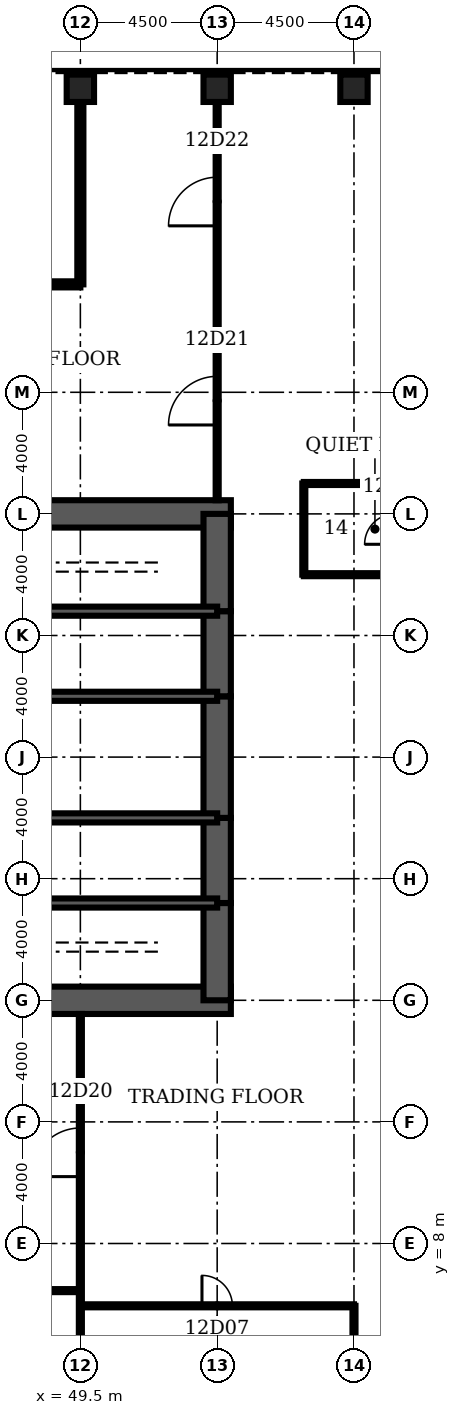
"""IFC4 building model, lengths in metres.
Left out: names, types, materials, properties, quantities, classifications, styles, units other than length and angle.
Written with IfcOpenShell. Run it as: python <this file> out.ifc"""

import sys

from ifc_helpers import new_model, si_unit, direction, frame, frame_2d, origin, origin_2d, place, context, subcontext, project, spatial, rectangle, hollow_rectangle, extrude, element, fill, save


model = new_model("IFC4")
c1 = context("Model", 3, precision=1e-05, world=origin(), true_north=direction((0.0, 1.0)))
c2 = subcontext(c1, "Body", "Model", "MODEL_VIEW")
j1 = project(units=[si_unit("LENGTHUNIT", "METRE"), si_unit("PLANEANGLEUNIT", "RADIAN")], contexts=[c1])
p1 = place(None, origin())
s1 = spatial("IfcSite", under=j1, at=p1, CompositionType="ELEMENT")
p2 = place(p1, origin())
s2 = spatial("IfcBuilding", under=s1, at=p2, CompositionType="ELEMENT")
p3 = place(p2, frame((0.0, 0.0, 59.0)))
s3 = spatial("IfcBuildingStorey", under=s2, at=p3, CompositionType="ELEMENT", Elevation=59.0)
for number, where, z_axis, x_axis in (
    (1, (58.5, 46.0, 0.0), (0.0, 0.0, 1.0), (0.0, 1.0, 0.0)),
    (2, (54.0, 46.0, 0.0), (0.0, 0.0, 1.0), (0.0, 1.0, 0.0)),
    (3, (49.5, 46.0, 0.0), (0.0, 0.0, 1.0), (0.0, 1.0, 0.0)),
):
    element("IfcColumn", number, at=place(p3, frame(where, z_axis=z_axis, x_axis=x_axis)), inside=s3, PredefinedType="COLUMN", context=c2, shape_type="SweptSolid", body=[
        extrude(hollow_rectangle(XDim=0.9, YDim=0.9, WallThickness=0.12, at=origin_2d()), origin(), (0.0, 0.0, 1.0), 4.5),
    ])
for number, where, z_axis, x_axis in (
    (4, (45.0, 16.0, 0.0), (0.0, 0.0, 1.0), (1.0, 0.0, 0.0)),
    (5, (54.45, 32.0, 0.0), (0.0, 0.0, 1.0), (-1.0, 0.0, 0.0)),
):
    element("IfcWall", number, at=place(p3, frame(where, z_axis=z_axis, x_axis=x_axis)), inside=s3, PredefinedType="SHEAR", context=c2, shape_type="SweptSolid", body=[
        extrude(rectangle(XDim=9.45, YDim=0.9, at=frame_2d((4.725, 0.0))), origin(), (0.0, 0.0, 1.0), 4.5),
    ])
p4 = place(p3, frame((54.0, 16.0, 0.0), z_axis=(0.0, 0.0, 1.0), x_axis=(0.0, 1.0, 0.0)))
e6 = element("IfcWall", 6, at=p4, inside=s3, PredefinedType="SHEAR", context=c2, shape_type="SweptSolid", body=[
    extrude(rectangle(XDim=3.2, YDim=0.9, at=frame_2d((1.6, 0.0))), origin(), (0.0, 0.0, 1.0), 4.5),
])
p5 = place(p3, frame((54.0, 19.2, 0.0), z_axis=(0.0, 0.0, 1.0), x_axis=(0.0, 1.0, 0.0)))
e7 = element("IfcWall", 7, at=p5, inside=s3, PredefinedType="SHEAR", context=c2, shape_type="SweptSolid", body=[
    extrude(rectangle(XDim=2.8, YDim=0.9, at=frame_2d((1.4, 0.0))), origin(), (0.0, 0.0, 1.0), 4.5),
])
p6 = place(p5, frame((0.4, 0.0, 0.0)))
e8 = element("IfcOpeningElement", 8, at=p6, cuts=e7, PredefinedType="OPENING", context=c2, shape_type="SweptSolid", body=[
    extrude(rectangle(XDim=1.8, YDim=2.1, at=frame_2d((0.9, 1.05))), frame((0.0, 0.46, 0.0), z_axis=(0.0, -1.0, 0.0), x_axis=(1.0, 0.0, 0.0)), (0.0, 0.0, 1.0), 0.92),
])
p7 = place(p3, frame((54.0, 22.0, 0.0), z_axis=(0.0, 0.0, 1.0), x_axis=(0.0, 1.0, 0.0)))
e9 = element("IfcWall", 9, at=p7, inside=s3, PredefinedType="SHEAR", context=c2, shape_type="SweptSolid", body=[
    extrude(rectangle(XDim=4.0, YDim=0.9, at=frame_2d((2.0, 0.0))), origin(), (0.0, 0.0, 1.0), 4.5),
])
p8 = place(p3, frame((54.0, 26.0, 0.0), z_axis=(0.0, 0.0, 1.0), x_axis=(0.0, 1.0, 0.0)))
e10 = element("IfcWall", 10, at=p8, inside=s3, PredefinedType="SHEAR", context=c2, shape_type="SweptSolid", body=[
    extrude(rectangle(XDim=2.8, YDim=0.9, at=frame_2d((1.4, 0.0))), origin(), (0.0, 0.0, 1.0), 4.5),
])
p9 = place(p8, frame((0.6, 0.0, 0.0)))
e11 = element("IfcOpeningElement", 11, at=p9, cuts=e10, PredefinedType="OPENING", context=c2, shape_type="SweptSolid", body=[
    extrude(rectangle(XDim=1.8, YDim=2.1, at=frame_2d((0.9, 1.05))), frame((0.0, 0.46, 0.0), z_axis=(0.0, -1.0, 0.0), x_axis=(1.0, 0.0, 0.0)), (0.0, 0.0, 1.0), 0.92),
])
p10 = place(p3, frame((54.0, 28.8, 0.0), z_axis=(0.0, 0.0, 1.0), x_axis=(0.0, 1.0, 0.0)))
e12 = element("IfcWall", 12, at=p10, inside=s3, PredefinedType="SHEAR", context=c2, shape_type="SweptSolid", body=[
    extrude(rectangle(XDim=3.2, YDim=0.9, at=frame_2d((1.6, 0.0))), origin(), (0.0, 0.0, 1.0), 4.5),
])
p11 = place(p3, frame((45.0, 19.2, 0.0), z_axis=(0.0, 0.0, 1.0), x_axis=(1.0, 0.0, 0.0)))
e13 = element("IfcWall", 13, at=p11, inside=s3, PredefinedType="SOLIDWALL", context=c2, shape_type="SweptSolid", body=[
    extrude(rectangle(XDim=9.0, YDim=0.3, at=frame_2d((4.5, 0.0))), origin(), (0.0, 0.0, 1.0), 4.5),
])
p12 = place(p11, frame((7.35, 0.0, 0.0)))
e14 = element("IfcOpeningElement", 14, at=p12, cuts=e13, PredefinedType="OPENING", context=c2, shape_type="SweptSolid", body=[
    extrude(rectangle(XDim=1.0, YDim=2.1, at=frame_2d((0.5, 1.05))), frame((0.0, 0.16, 0.0), z_axis=(0.0, -1.0, 0.0), x_axis=(1.0, 0.0, 0.0)), (0.0, 0.0, 1.0), 0.32),
])
p13 = place(p3, frame((45.0, 28.8, 0.0), z_axis=(0.0, 0.0, 1.0), x_axis=(1.0, 0.0, 0.0)))
e15 = element("IfcWall", 15, at=p13, inside=s3, PredefinedType="SOLIDWALL", context=c2, shape_type="SweptSolid", body=[
    extrude(rectangle(XDim=9.0, YDim=0.3, at=frame_2d((4.5, 0.0))), origin(), (0.0, 0.0, 1.0), 4.5),
])
p14 = place(p13, frame((7.35, 0.0, 0.0)))
e16 = element("IfcOpeningElement", 16, at=p14, cuts=e15, PredefinedType="OPENING", context=c2, shape_type="SweptSolid", body=[
    extrude(rectangle(XDim=1.0, YDim=2.1, at=frame_2d((0.5, 1.05))), frame((0.0, 0.16, 0.0), z_axis=(0.0, -1.0, 0.0), x_axis=(1.0, 0.0, 0.0)), (0.0, 0.0, 1.0), 0.32),
])
p15 = place(p3, frame((48.0, 22.0, 0.0), z_axis=(0.0, 0.0, 1.0), x_axis=(1.0, 0.0, 0.0)))
e17 = element("IfcWall", 17, at=p15, inside=s3, PredefinedType="SOLIDWALL", context=c2, shape_type="SweptSolid", body=[
    extrude(rectangle(XDim=6.0, YDim=0.3, at=frame_2d((3.0, 0.0))), origin(), (0.0, 0.0, 1.0), 4.5),
])
p16 = place(p15, frame((2.0, 0.0, 0.0)))
e18 = element("IfcOpeningElement", 18, at=p16, cuts=e17, PredefinedType="OPENING", context=c2, shape_type="SweptSolid", body=[
    extrude(rectangle(XDim=1.0, YDim=2.1, at=frame_2d((0.5, 1.05))), frame((0.0, 0.16, 0.0), z_axis=(0.0, -1.0, 0.0), x_axis=(1.0, 0.0, 0.0)), (0.0, 0.0, 1.0), 0.32),
])
p17 = place(p15, frame((4.15, 0.0, 0.0)))
e19 = element("IfcOpeningElement", 19, at=p17, cuts=e17, PredefinedType="OPENING", context=c2, shape_type="SweptSolid", body=[
    extrude(rectangle(XDim=1.0, YDim=2.1, at=frame_2d((0.5, 1.05))), frame((0.0, 0.16, 0.0), z_axis=(0.0, -1.0, 0.0), x_axis=(1.0, 0.0, 0.0)), (0.0, 0.0, 1.0), 0.32),
])
p18 = place(p3, frame((48.0, 26.0, 0.0), z_axis=(0.0, 0.0, 1.0), x_axis=(1.0, 0.0, 0.0)))
e20 = element("IfcWall", 20, at=p18, inside=s3, PredefinedType="SOLIDWALL", context=c2, shape_type="SweptSolid", body=[
    extrude(rectangle(XDim=6.0, YDim=0.3, at=frame_2d((3.0, 0.0))), origin(), (0.0, 0.0, 1.0), 4.5),
])
p19 = place(p3, frame((51.675, 22.15, 0.0), z_axis=(0.0, 0.0, 1.0), x_axis=(0.0, 1.0, 0.0)))
e21 = element("IfcWall", 21, at=p19, inside=s3, PredefinedType="PARTITIONING", context=c2, shape_type="SweptSolid", body=[
    extrude(rectangle(XDim=3.7, YDim=0.15, at=frame_2d((1.85, 0.0))), origin(), (0.0, 0.0, 1.0), 3.0),
])
p20 = place(p3, frame((49.5, 5.95, 0.0), z_axis=(0.0, 0.0, 1.0), x_axis=(1.0, 0.0, 0.0)))
e22 = element("IfcWall", 22, at=p20, inside=s3, PredefinedType="PARTITIONING", context=c2, shape_type="SweptSolid", body=[
    extrude(rectangle(XDim=9.0, YDim=0.1, at=frame_2d((4.5, 0.0))), origin(), (0.0, 0.0, 1.0), 3.0),
])
p21 = place(p20, frame((4.0, 0.0, 0.0)))
e23 = element("IfcOpeningElement", 23, at=p21, cuts=e22, PredefinedType="OPENING", context=c2, shape_type="SweptSolid", body=[
    extrude(rectangle(XDim=1.0, YDim=2.1, at=frame_2d((0.5, 1.05))), frame((0.0, 0.06, 0.0), z_axis=(0.0, -1.0, 0.0), x_axis=(1.0, 0.0, 0.0)), (0.0, 0.0, 1.0), 0.12),
])
p22 = place(p3, frame((36.0, 6.45, 0.0), z_axis=(0.0, 0.0, 1.0), x_axis=(1.0, 0.0, 0.0)))
e24 = element("IfcWall", 24, at=p22, inside=s3, PredefinedType="PARTITIONING", context=c2, shape_type="SweptSolid", body=[
    extrude(rectangle(XDim=13.5, YDim=0.1, at=frame_2d((6.75, 0.0))), origin(), (0.0, 0.0, 1.0), 3.0),
])
p23 = place(p22, frame((5.95, 0.0, 0.0)))
e25 = element("IfcOpeningElement", 25, at=p23, cuts=e24, PredefinedType="OPENING", context=c2, shape_type="SweptSolid", body=[
    extrude(rectangle(XDim=1.6, YDim=2.1, at=frame_2d((0.8, 1.05))), frame((0.0, 0.06, 0.0), z_axis=(0.0, -1.0, 0.0), x_axis=(1.0, 0.0, 0.0)), (0.0, 0.0, 1.0), 0.12),
])
for number, where, z_axis, x_axis in (
    (26, (56.85, 30.0, 0.0), (0.0, 0.0, 1.0), (1.0, 0.0, 0.0)),
    (27, (56.85, 33.0, 0.0), (0.0, 0.0, 1.0), (1.0, 0.0, 0.0)),
):
    element("IfcWall", number, at=place(p3, frame(where, z_axis=z_axis, x_axis=x_axis)), inside=s3, PredefinedType="PARTITIONING", context=c2, shape_type="SweptSolid", body=[
        extrude(rectangle(XDim=3.0, YDim=0.1, at=frame_2d((1.5, 0.0))), origin(), (0.0, 0.0, 1.0), 3.0),
    ])
p24 = place(p3, frame((40.5, 39.55, 0.0), z_axis=(0.0, 0.0, 1.0), x_axis=(1.0, 0.0, 0.0)))
e28 = element("IfcWall", 28, at=p24, inside=s3, PredefinedType="PARTITIONING", context=c2, shape_type="SweptSolid", body=[
    extrude(rectangle(XDim=9.0, YDim=0.2, at=frame_2d((4.5, 0.0))), origin(), (0.0, 0.0, 1.0), 3.0),
])
p25 = place(p24, frame((3.7, 0.0, 0.0)))
e29 = element("IfcOpeningElement", 29, at=p25, cuts=e28, PredefinedType="OPENING", context=c2, shape_type="SweptSolid", body=[
    extrude(rectangle(XDim=1.6, YDim=2.1, at=frame_2d((0.8, 1.05))), frame((0.0, 0.11, 0.0), z_axis=(0.0, -1.0, 0.0), x_axis=(1.0, 0.0, 0.0)), (0.0, 0.0, 1.0), 0.22),
])
p26 = place(p3, frame((49.5, 0.45, 0.0), z_axis=(0.0, 0.0, 1.0), x_axis=(0.0, 1.0, 0.0)))
e30 = element("IfcWall", 30, at=p26, inside=s3, PredefinedType="PARTITIONING", context=c2, shape_type="SweptSolid", body=[
    extrude(rectangle(XDim=15.1, YDim=0.1, at=frame_2d((7.55, 0.0))), origin(), (0.0, 0.0, 1.0), 3.0),
])
p27 = place(p26, frame((9.75, 0.0, 0.0)))
e31 = element("IfcOpeningElement", 31, at=p27, cuts=e30, PredefinedType="OPENING", context=c2, shape_type="SweptSolid", body=[
    extrude(rectangle(XDim=1.6, YDim=2.1, at=frame_2d((0.8, 1.05))), frame((0.0, 0.06, 0.0), z_axis=(0.0, -1.0, 0.0), x_axis=(1.0, 0.0, 0.0)), (0.0, 0.0, 1.0), 0.12),
])
p28 = place(p3, frame((49.5, 39.55, 0.0), z_axis=(0.0, 0.0, 1.0), x_axis=(0.0, 1.0, 0.0)))
e32 = element("IfcWall", 32, at=p28, inside=s3, PredefinedType="PARTITIONING", context=c2, shape_type="SweptSolid", body=[
    extrude(rectangle(XDim=6.0, YDim=0.2, at=frame_2d((3.0, 0.0))), origin(), (0.0, 0.0, 1.0), 3.0),
])
p29 = place(p3, frame((54.0, 32.45, 0.0), z_axis=(0.0, 0.0, 1.0), x_axis=(0.0, 1.0, 0.0)))
e33 = element("IfcWall", 33, at=p29, inside=s3, PredefinedType="PARTITIONING", context=c2, shape_type="SweptSolid", body=[
    extrude(rectangle(XDim=13.1, YDim=0.1, at=frame_2d((6.55, 0.0))), origin(), (0.0, 0.0, 1.0), 3.0),
])
p30 = place(p29, frame((2.475, 0.0, 0.0)))
e34 = element("IfcOpeningElement", 34, at=p30, cuts=e33, PredefinedType="OPENING", context=c2, shape_type="SweptSolid", body=[
    extrude(rectangle(XDim=1.6, YDim=2.1, at=frame_2d((0.8, 1.05))), frame((0.0, 0.06, 0.0), z_axis=(0.0, -1.0, 0.0), x_axis=(1.0, 0.0, 0.0)), (0.0, 0.0, 1.0), 0.12),
])
p31 = place(p29, frame((9.025, 0.0, 0.0)))
e35 = element("IfcOpeningElement", 35, at=p31, cuts=e33, PredefinedType="OPENING", context=c2, shape_type="SweptSolid", body=[
    extrude(rectangle(XDim=1.6, YDim=2.1, at=frame_2d((0.8, 1.05))), frame((0.0, 0.06, 0.0), z_axis=(0.0, -1.0, 0.0), x_axis=(1.0, 0.0, 0.0)), (0.0, 0.0, 1.0), 0.12),
])
p32 = place(p3, frame((56.85, 30.0, 0.0), z_axis=(0.0, 0.0, 1.0), x_axis=(0.0, 1.0, 0.0)))
e36 = element("IfcWall", 36, at=p32, inside=s3, PredefinedType="PARTITIONING", context=c2, shape_type="SweptSolid", body=[
    extrude(rectangle(XDim=3.0, YDim=0.1, at=frame_2d((1.5, 0.0))), origin(), (0.0, 0.0, 1.0), 3.0),
])
p33 = place(p3, frame((58.5, 0.45, 0.0), z_axis=(0.0, 0.0, 1.0), x_axis=(0.0, 1.0, 0.0)))
e37 = element("IfcWall", 37, at=p33, inside=s3, PredefinedType="PARTITIONING", context=c2, shape_type="SweptSolid", body=[
    extrude(rectangle(XDim=5.5, YDim=0.1, at=frame_2d((2.75, 0.0))), origin(), (0.0, 0.0, 1.0), 3.0),
])
p34 = place(p21, origin())
e38 = element("IfcDoor", 38, at=p34, inside=s3, OperationType="SINGLE_SWING_LEFT", PredefinedType="DOOR", context=c2, shape_type="SweptSolid", body=[
    extrude(rectangle(XDim=1.0, YDim=2.1, at=frame_2d((0.5, 1.05))), frame((0.0, 0.025, 0.0), z_axis=(0.0, -1.0, 0.0), x_axis=(1.0, 0.0, 0.0)), (0.0, 0.0, 1.0), 0.05),
])
fill(e23, e38)
p35 = place(p27, origin())
e39 = element("IfcDoor", 39, at=p35, inside=s3, OperationType="SINGLE_SWING_LEFT", PredefinedType="DOOR", context=c2, shape_type="SweptSolid", body=[
    extrude(rectangle(XDim=1.6, YDim=2.1, at=frame_2d((0.8, 1.05))), frame((0.0, 0.025, 0.0), z_axis=(0.0, -1.0, 0.0), x_axis=(1.0, 0.0, 0.0)), (0.0, 0.0, 1.0), 0.05),
])
fill(e31, e39)
p36 = place(p30, origin())
e40 = element("IfcDoor", 40, at=p36, inside=s3, OperationType="SINGLE_SWING_LEFT", PredefinedType="DOOR", context=c2, shape_type="SweptSolid", body=[
    extrude(rectangle(XDim=1.6, YDim=2.1, at=frame_2d((0.8, 1.05))), frame((0.0, 0.025, 0.0), z_axis=(0.0, -1.0, 0.0), x_axis=(1.0, 0.0, 0.0)), (0.0, 0.0, 1.0), 0.05),
])
fill(e34, e40)
p37 = place(p31, origin())
e41 = element("IfcDoor", 41, at=p37, inside=s3, OperationType="SINGLE_SWING_LEFT", PredefinedType="DOOR", context=c2, shape_type="SweptSolid", body=[
    extrude(rectangle(XDim=1.6, YDim=2.1, at=frame_2d((0.8, 1.05))), frame((0.0, 0.025, 0.0), z_axis=(0.0, -1.0, 0.0), x_axis=(1.0, 0.0, 0.0)), (0.0, 0.0, 1.0), 0.05),
])
fill(e35, e41)
p38 = place(p12, origin())
e42 = element("IfcDoor", 42, at=p38, inside=s3, OperationType="SINGLE_SWING_RIGHT", PredefinedType="DOOR", context=c2, shape_type="SweptSolid", body=[
    extrude(rectangle(XDim=1.0, YDim=2.1, at=frame_2d((0.5, 1.05))), frame((0.0, 0.025, 0.0), z_axis=(0.0, -1.0, 0.0), x_axis=(1.0, 0.0, 0.0)), (0.0, 0.0, 1.0), 0.05),
])
fill(e14, e42)
p39 = place(p14, origin())
e43 = element("IfcDoor", 43, at=p39, inside=s3, OperationType="SINGLE_SWING_RIGHT", PredefinedType="DOOR", context=c2, shape_type="SweptSolid", body=[
    extrude(rectangle(XDim=1.0, YDim=2.1, at=frame_2d((0.5, 1.05))), frame((0.0, 0.025, 0.0), z_axis=(0.0, -1.0, 0.0), x_axis=(1.0, 0.0, 0.0)), (0.0, 0.0, 1.0), 0.05),
])
fill(e16, e43)
p40 = place(p6, origin())
e44 = element("IfcDoor", 44, at=p40, inside=s3, OperationType="SINGLE_SWING_LEFT", PredefinedType="DOOR", context=c2, shape_type="SweptSolid", body=[
    extrude(rectangle(XDim=1.8, YDim=2.1, at=frame_2d((0.9, 1.05))), frame((0.0, 0.45, 0.0), z_axis=(0.0, -1.0, 0.0), x_axis=(1.0, 0.0, 0.0)), (0.0, 0.0, 1.0), 0.899),
])
fill(e8, e44)
p41 = place(p9, origin())
e45 = element("IfcDoor", 45, at=p41, inside=s3, OperationType="SINGLE_SWING_LEFT", PredefinedType="DOOR", context=c2, shape_type="SweptSolid", body=[
    extrude(rectangle(XDim=1.8, YDim=2.1, at=frame_2d((0.9, 1.05))), frame((0.0, 0.45, 0.0), z_axis=(0.0, -1.0, 0.0), x_axis=(1.0, 0.0, 0.0)), (0.0, 0.0, 1.0), 0.899),
])
fill(e11, e45)
p42 = place(p16, origin())
e46 = element("IfcDoor", 46, at=p42, inside=s3, OperationType="SINGLE_SWING_LEFT", PredefinedType="DOOR", context=c2, shape_type="SweptSolid", body=[
    extrude(rectangle(XDim=1.0, YDim=2.1, at=frame_2d((0.5, 1.05))), frame((0.0, 0.025, 0.0), z_axis=(0.0, -1.0, 0.0), x_axis=(1.0, 0.0, 0.0)), (0.0, 0.0, 1.0), 0.05),
])
fill(e18, e46)
p43 = place(p17, origin())
e47 = element("IfcDoor", 47, at=p43, inside=s3, OperationType="SINGLE_SWING_RIGHT", PredefinedType="DOOR", context=c2, shape_type="SweptSolid", body=[
    extrude(rectangle(XDim=1.0, YDim=2.1, at=frame_2d((0.5, 1.05))), frame((0.0, 0.025, 0.0), z_axis=(0.0, -1.0, 0.0), x_axis=(1.0, 0.0, 0.0)), (0.0, 0.0, 1.0), 0.05),
])
fill(e19, e47)
save(model, sys.argv[1])
